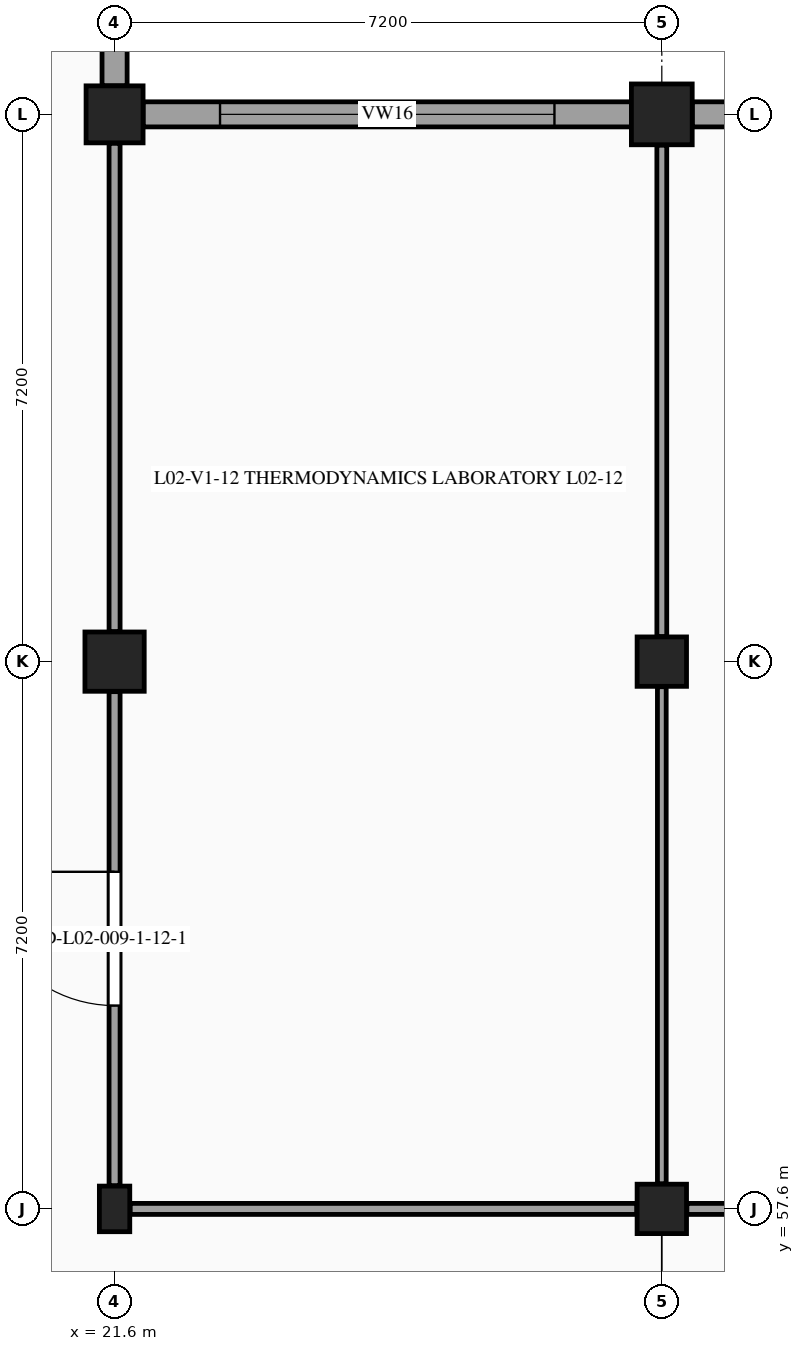
"""IFC4 building model, lengths in metres.
Left out: names, types, materials, properties, quantities, classifications, styles, units other than length and angle.
Written with IfcOpenShell. Run it as: python <this file> out.ifc"""

import sys

from ifc_helpers import new_model, si_unit, direction, frame, frame_2d, origin, origin_2d, place, context, subcontext, project, spatial, rectangle, circle, extrude, element, fill, save


model = new_model("IFC4")
c1 = context("Model", 3, precision=1e-05, world=origin(), true_north=direction((0.0, 1.0)))
c2 = subcontext(c1, "Body", "Model", "MODEL_VIEW")
j1 = project(units=[si_unit("LENGTHUNIT", "METRE"), si_unit("PLANEANGLEUNIT", "RADIAN")], contexts=[c1])
p1 = place(None, origin())
s1 = spatial("IfcSite", under=j1, at=p1, CompositionType="ELEMENT")
p2 = place(p1, origin())
s2 = spatial("IfcBuilding", under=s1, at=p2, CompositionType="ELEMENT")
p3 = place(p2, frame((0.0, 0.0, 9.9)))
s3 = spatial("IfcBuildingStorey", under=s2, at=p3, CompositionType="ELEMENT", Elevation=9.9)
p4 = place(p3, frame((21.6, 57.6, 0.0), z_axis=(0.0, 0.0, 1.0), x_axis=(1.0, 0.0, 0.0)))
e1 = element("IfcColumn", 1, at=p4, inside=s3, PredefinedType="PILASTER", context=c2, shape_type="SweptSolid", body=[
    extrude(rectangle(XDim=0.4, YDim=0.6, at=origin_2d()), origin(), (0.0, 0.0, 1.0), 4.5),
])
p5 = place(p3, frame((21.6, 64.8, 0.0), z_axis=(0.0, 0.0, 1.0), x_axis=(1.0, 0.0, 0.0)))
e2 = element("IfcColumn", 2, at=p5, inside=s3, PredefinedType="COLUMN", context=c2, shape_type="SweptSolid", body=[
    extrude(rectangle(XDim=0.78, YDim=0.78, at=origin_2d()), origin(), (0.0, 0.0, 1.0), 4.5),
])
p6 = place(p3, frame((21.6, 72.0, 0.0), z_axis=(0.0, 0.0, 1.0), x_axis=(1.0, 0.0, 0.0)))
e3 = element("IfcColumn", 3, at=p6, inside=s3, PredefinedType="COLUMN", context=c2, shape_type="SweptSolid", body=[
    extrude(rectangle(XDim=0.75, YDim=0.75, at=origin_2d()), origin(), (0.0, 0.0, 1.0), 4.5),
])
for number, where, z_axis, x_axis in (
    (4, (28.8, 57.6, 0.0), (0.0, 0.0, 1.0), (1.0, 0.0, 0.0)),
    (5, (28.8, 64.8, 0.0), (0.0, 0.0, 1.0), (1.0, 0.0, 0.0)),
):
    element("IfcColumn", number, at=place(p3, frame(where, z_axis=z_axis, x_axis=x_axis)), inside=s3, PredefinedType="COLUMN", context=c2, shape_type="SweptSolid", body=[
        extrude(rectangle(XDim=0.65, YDim=0.65, at=origin_2d()), origin(), (0.0, 0.0, 1.0), 4.5),
    ])
p7 = place(p3, frame((28.8, 72.0, 0.0), z_axis=(0.0, 0.0, 1.0), x_axis=(1.0, 0.0, 0.0)))
e6 = element("IfcColumn", 6, at=p7, inside=s3, PredefinedType="COLUMN", context=c2, shape_type="SweptSolid", body=[
    extrude(circle(Radius=0.4, at=origin_2d()), origin(), (0.0, 0.0, 1.0), 4.5),
])
p8 = place(p3, frame((21.6, 78.84, 0.0), z_axis=(0.0, 0.0, 1.0), x_axis=(0.0, -1.0, 0.0)))
e7 = element("IfcWall", 7, at=p8, inside=s3, PredefinedType="STANDARD", context=c2, shape_type="SweptSolid", body=[
    extrude(rectangle(XDim=6.465, YDim=0.33, at=frame_2d((3.232, 0.0))), origin(), (0.0, 0.0, 1.0), 3.47),
])
p9 = place(p8, frame((0.683, 0.0, 0.98)))
e8 = element("IfcOpeningElement", 8, at=p9, cuts=e7, PredefinedType="OPENING", context=c2, shape_type="SweptSolid", body=[
    extrude(rectangle(XDim=5.1, YDim=1.75, at=frame_2d((2.55, 0.875))), frame((0.0, 0.175, 0.0), z_axis=(0.0, -1.0, 0.0), x_axis=(1.0, 0.0, 0.0)), (0.0, 0.0, 1.0), 0.35),
])
p10 = place(p3, frame((21.975, 72.0, 0.0), z_axis=(0.0, 0.0, 1.0), x_axis=(1.0, 0.0, 0.0)))
e9 = element("IfcWall", 9, at=p10, inside=s3, PredefinedType="STANDARD", context=c2, shape_type="SweptSolid", body=[
    extrude(rectangle(XDim=6.425, YDim=0.33, at=frame_2d((3.212, 0.0))), origin(), (0.0, 0.0, 1.0), 4.225),
])
p11 = place(p10, frame((1.012, 0.0, 0.98)))
e10 = element("IfcOpeningElement", 10, at=p11, cuts=e9, PredefinedType="OPENING", context=c2, shape_type="SweptSolid", body=[
    extrude(rectangle(XDim=4.4, YDim=1.65, at=frame_2d((2.2, 0.825))), frame((0.0, 0.175, 0.0), z_axis=(0.0, -1.0, 0.0), x_axis=(1.0, 0.0, 0.0)), (0.0, 0.0, 1.0), 0.35),
])
p12 = place(p3, frame((29.2, 72.0, 0.0), z_axis=(0.0, 0.0, 1.0), x_axis=(1.0, 0.0, 0.0)))
e11 = element("IfcWall", 11, at=p12, inside=s3, PredefinedType="STANDARD", context=c2, shape_type="SweptSolid", body=[
    extrude(rectangle(XDim=6.4, YDim=0.33, at=frame_2d((3.2, 0.0))), origin(), (0.0, 0.0, 1.0), 3.745),
])
p13 = place(p12, frame((1.3, 0.0, 0.98)))
e12 = element("IfcOpeningElement", 12, at=p13, cuts=e11, PredefinedType="OPENING", context=c2, shape_type="SweptSolid", body=[
    extrude(rectangle(XDim=3.8, YDim=1.6, at=frame_2d((1.9, 0.8))), frame((0.0, 0.175, 0.0), z_axis=(0.0, -1.0, 0.0), x_axis=(1.0, 0.0, 0.0)), (0.0, 0.0, 1.0), 0.35),
])
p14 = place(p3, frame((21.6, 57.905, 0.0), z_axis=(0.0, 0.0, 1.0), x_axis=(0.0, 1.0, 0.0)))
e13 = element("IfcWall", 13, at=p14, inside=s3, PredefinedType="PARTITIONING", context=c2, shape_type="SweptSolid", body=[
    extrude(rectangle(XDim=6.5, YDim=0.145, at=frame_2d((3.25, 0.0))), origin(), (0.0, 0.0, 1.0), 3.47),
])
p15 = place(p14, frame((2.37, 0.0, 0.0)))
e14 = element("IfcOpeningElement", 14, at=p15, cuts=e13, PredefinedType="OPENING", context=c2, shape_type="SweptSolid", body=[
    extrude(rectangle(XDim=1.76, YDim=2.3, at=frame_2d((0.88, 1.15))), frame((0.0, 0.083, 0.0), z_axis=(0.0, -1.0, 0.0), x_axis=(1.0, 0.0, 0.0)), (0.0, 0.0, 1.0), 0.165),
])
p16 = place(p3, frame((21.6, 65.195, 0.0), z_axis=(0.0, 0.0, 1.0), x_axis=(0.0, 1.0, 0.0)))
e15 = element("IfcWall", 15, at=p16, inside=s3, PredefinedType="PARTITIONING", context=c2, shape_type="SweptSolid", body=[
    extrude(rectangle(XDim=6.425, YDim=0.145, at=frame_2d((3.212, 0.0))), origin(), (0.0, 0.0, 1.0), 3.47),
])
p17 = place(p3, frame((21.805, 57.6, 0.0), z_axis=(0.0, 0.0, 1.0), x_axis=(1.0, 0.0, 0.0)))
e16 = element("IfcWall", 16, at=p17, inside=s3, PredefinedType="PARTITIONING", context=c2, shape_type="SweptSolid", body=[
    extrude(rectangle(XDim=6.665, YDim=0.145, at=frame_2d((3.333, 0.0))), origin(), (0.0, 0.0, 1.0), 4.225),
])
p18 = place(p3, frame((28.8, 57.93, 0.0), z_axis=(0.0, 0.0, 1.0), x_axis=(0.0, 1.0, 0.0)))
e17 = element("IfcWall", 17, at=p18, inside=s3, PredefinedType="PARTITIONING", context=c2, shape_type="SweptSolid", body=[
    extrude(rectangle(XDim=6.54, YDim=0.115, at=frame_2d((3.27, 0.0))), origin(), (0.0, 0.0, 1.0), 3.745),
])
p19 = place(p3, frame((28.8, 65.13, 0.0), z_axis=(0.0, 0.0, 1.0), x_axis=(0.0, 1.0, 0.0)))
e18 = element("IfcWall", 18, at=p19, inside=s3, PredefinedType="PARTITIONING", context=c2, shape_type="SweptSolid", body=[
    extrude(rectangle(XDim=6.465, YDim=0.13, at=frame_2d((3.232, 0.0))), origin(), (0.0, 0.0, 1.0), 3.745),
])
p20 = place(p3, frame((29.13, 57.6, 0.0), z_axis=(0.0, 0.0, 1.0), x_axis=(1.0, 0.0, 0.0)))
e19 = element("IfcWall", 19, at=p20, inside=s3, PredefinedType="PARTITIONING", context=c2, shape_type="SweptSolid", body=[
    extrude(rectangle(XDim=6.54, YDim=0.145, at=frame_2d((3.27, 0.0))), origin(), (0.0, 0.0, 1.0), 3.84),
])
p21 = place(p20, frame((2.49, 0.0, 0.0)))
e20 = element("IfcOpeningElement", 20, at=p21, cuts=e19, PredefinedType="OPENING", context=c2, shape_type="SweptSolid", body=[
    extrude(rectangle(XDim=1.56, YDim=2.25, at=frame_2d((0.78, 1.125))), frame((0.0, 0.083, 0.0), z_axis=(0.0, -1.0, 0.0), x_axis=(1.0, 0.0, 0.0)), (0.0, 0.0, 1.0), 0.165),
])
p22 = place(p11, origin())
e21 = element("IfcWindow", 21, at=p22, inside=s3, PartitioningType="SINGLE_PANEL", PredefinedType="WINDOW", context=c2, shape_type="SweptSolid", body=[
    extrude(rectangle(XDim=4.4, YDim=1.65, at=frame_2d((2.2, 0.825))), frame((0.0, -0.03, 0.0), z_axis=(0.0, -1.0, 0.0), x_axis=(1.0, 0.0, 0.0)), (0.0, 0.0, 1.0), 0.06),
])
fill(e10, e21)
p23 = place(p15, origin())
e22 = element("IfcDoor", 22, at=p23, inside=s3, OperationType="SINGLE_SWING_RIGHT", PredefinedType="DOOR", context=c2, shape_type="SweptSolid", body=[
    extrude(rectangle(XDim=1.76, YDim=2.3, at=frame_2d((0.88, 1.15))), frame((0.0, 0.025, 0.0), z_axis=(0.0, -1.0, 0.0), x_axis=(1.0, 0.0, 0.0)), (0.0, 0.0, 1.0), 0.05),
])
fill(e14, e22)
save(model, sys.argv[1])
